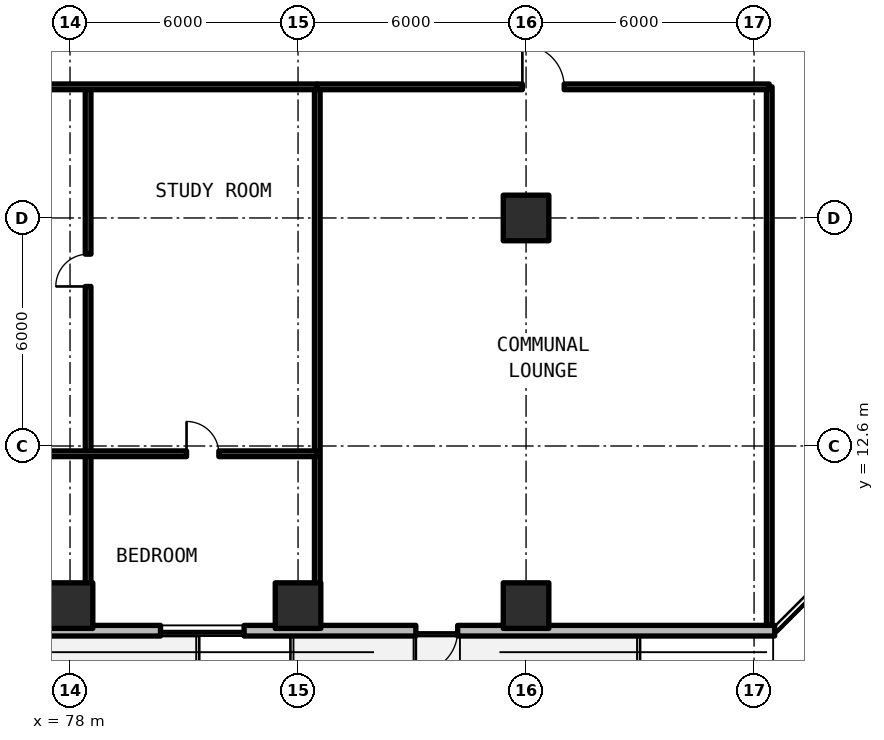
"""IFC4 building model, lengths in metres.
Left out: names, types, materials, properties, quantities, classifications, styles, units other than length and angle.
Written with IfcOpenShell. Run it as: python <this file> out.ifc"""

import sys

from ifc_helpers import new_model, si_unit, direction, frame, frame_2d, origin, origin_2d, place, context, subcontext, project, spatial, rectangle, extrude, element, fill, save


model = new_model("IFC4")
c1 = context("Model", 3, precision=1e-05, world=origin(), true_north=direction((0.0, 1.0)))
c2 = subcontext(c1, "Body", "Model", "MODEL_VIEW")
j1 = project(units=[si_unit("LENGTHUNIT", "METRE"), si_unit("PLANEANGLEUNIT", "RADIAN")], contexts=[c1])
p1 = place(None, origin())
s1 = spatial("IfcSite", under=j1, at=p1, CompositionType="ELEMENT")
p2 = place(p1, origin())
s2 = spatial("IfcBuilding", under=s1, at=p2, CompositionType="ELEMENT")
p3 = place(p2, frame((0.0, 0.0, 52.14)))
s3 = spatial("IfcBuildingStorey", under=s2, at=p3, CompositionType="ELEMENT", Elevation=52.14)
for number, where, z_axis, x_axis in (
    (1, (90.0, 18.6, 0.0), (0.0, 0.0, 1.0), (1.0, 0.0, 0.0)),
    (2, (78.0, 8.4, 0.0), (0.0, 0.0, 1.0), (1.0, 0.0, 0.0)),
    (3, (84.0, 8.4, 0.0), (0.0, 0.0, 1.0), (1.0, 0.0, 0.0)),
    (4, (90.0, 8.4, 0.0), (0.0, 0.0, 1.0), (1.0, 0.0, 0.0)),
):
    element("IfcColumn", number, at=place(p3, frame(where, z_axis=z_axis, x_axis=x_axis)), inside=s3, PredefinedType="COLUMN", context=c2, shape_type="SweptSolid", body=[
        extrude(rectangle(XDim=1.2, YDim=1.2, at=origin_2d()), origin(), (0.0, 0.0, 1.0), 3.3),
    ])
p4 = place(p3, frame((52.14, 7.74, 0.0), z_axis=(0.0, 0.0, 1.0), x_axis=(1.0, 0.0, 0.0)))
e5 = element("IfcWall", 5, at=p4, inside=s3, PredefinedType="SOLIDWALL", context=c2, shape_type="SweptSolid", body=[
    extrude(rectangle(XDim=44.402, YDim=0.28, at=frame_2d((22.201, 0.0))), origin(), (0.0, 0.0, 1.0), 3.08),
])
p5 = place(p4, frame((11.01, 0.0, 0.0)))
e6 = element("IfcOpeningElement", 6, at=p5, cuts=e5, PredefinedType="OPENING", context=c2, shape_type="SweptSolid", body=[
    extrude(rectangle(XDim=1.1, YDim=2.15, at=frame_2d((0.55, 1.075))), frame((0.0, 0.15, 0.0), z_axis=(0.0, -1.0, 0.0), x_axis=(1.0, 0.0, 0.0)), (0.0, 0.0, 1.0), 0.3),
])
p6 = place(p4, frame((22.86, 0.0, 0.0)))
e7 = element("IfcOpeningElement", 7, at=p6, cuts=e5, PredefinedType="OPENING", context=c2, shape_type="SweptSolid", body=[
    extrude(rectangle(XDim=1.1, YDim=2.15, at=frame_2d((0.55, 1.075))), frame((0.0, 0.15, 0.0), z_axis=(0.0, -1.0, 0.0), x_axis=(1.0, 0.0, 0.0)), (0.0, 0.0, 1.0), 0.3),
])
p7 = place(p4, frame((34.96, 0.0, 0.0)))
e8 = element("IfcOpeningElement", 8, at=p7, cuts=e5, PredefinedType="OPENING", context=c2, shape_type="SweptSolid", body=[
    extrude(rectangle(XDim=1.1, YDim=2.15, at=frame_2d((0.55, 1.075))), frame((0.0, 0.15, 0.0), z_axis=(0.0, -1.0, 0.0), x_axis=(1.0, 0.0, 0.0)), (0.0, 0.0, 1.0), 0.3),
])
p8 = place(p4, frame((2.69, 0.0, 0.78)))
e9 = element("IfcOpeningElement", 9, at=p8, cuts=e5, PredefinedType="OPENING", context=c2, shape_type="SweptSolid", body=[
    extrude(rectangle(XDim=2.2, YDim=1.66, at=frame_2d((1.1, 0.83))), frame((0.0, 0.15, 0.0), z_axis=(0.0, -1.0, 0.0), x_axis=(1.0, 0.0, 0.0)), (0.0, 0.0, 1.0), 0.3),
])
p9 = place(p4, frame((15.61, 0.0, 0.78)))
e10 = element("IfcOpeningElement", 10, at=p9, cuts=e5, PredefinedType="OPENING", context=c2, shape_type="SweptSolid", body=[
    extrude(rectangle(XDim=2.2, YDim=1.66, at=frame_2d((1.1, 0.83))), frame((0.0, 0.15, 0.0), z_axis=(0.0, -1.0, 0.0), x_axis=(1.0, 0.0, 0.0)), (0.0, 0.0, 1.0), 0.3),
])
p10 = place(p4, frame((28.241, 0.0, 0.78)))
e11 = element("IfcOpeningElement", 11, at=p10, cuts=e5, PredefinedType="OPENING", context=c2, shape_type="SweptSolid", body=[
    extrude(rectangle(XDim=2.2, YDim=1.66, at=frame_2d((1.1, 0.83))), frame((0.0, 0.15, 0.0), z_axis=(0.0, -1.0, 0.0), x_axis=(1.0, 0.0, 0.0)), (0.0, 0.0, 1.0), 0.3),
])
for number, where, z_axis, x_axis in (
    (12, (96.4, 7.88, 0.0), (0.0, 0.0, 1.0), (0.0, 1.0, 0.0)),
    (13, (84.506, 7.88, 0.0), (0.0, 0.0, 1.0), (0.0, 1.0, 0.0)),
):
    element("IfcWall", number, at=place(p3, frame(where, z_axis=z_axis, x_axis=x_axis)), inside=s3, PredefinedType="SOLIDWALL", context=c2, shape_type="SweptSolid", body=[
        extrude(rectangle(XDim=14.17, YDim=0.15, at=frame_2d((7.085, 0.0))), origin(), (0.0, 0.0, 1.0), 2.35),
    ])
p11 = place(p3, frame((78.476, 12.396, 0.0), z_axis=(0.0, 0.0, 1.0), x_axis=(0.0, 1.0, 0.0)))
e14 = element("IfcWall", 14, at=p11, inside=s3, PredefinedType="PARTITIONING", context=c2, shape_type="SweptSolid", body=[
    extrude(rectangle(XDim=9.655, YDim=0.15, at=frame_2d((4.827, 0.0))), origin(), (0.0, 0.0, 1.0), 2.35),
])
p12 = place(p11, frame((4.402, 0.0, 0.0)))
e15 = element("IfcOpeningElement", 15, at=p12, cuts=e14, PredefinedType="OPENING", context=c2, shape_type="SweptSolid", body=[
    extrude(rectangle(XDim=0.85, YDim=2.1, at=frame_2d((0.425, 1.05))), frame((0.0, 0.085, 0.0), z_axis=(0.0, -1.0, 0.0), x_axis=(1.0, 0.0, 0.0)), (0.0, 0.0, 1.0), 0.17),
])
p13 = place(p3, frame((78.476, 7.88, 0.0), z_axis=(0.0, 0.0, 1.0), x_axis=(0.0, 1.0, 0.0)))
e16 = element("IfcWall", 16, at=p13, inside=s3, PredefinedType="PARTITIONING", context=c2, shape_type="SweptSolid", body=[
    extrude(rectangle(XDim=4.516, YDim=0.15, at=frame_2d((2.258, 0.0))), origin(), (0.0, 0.0, 1.0), 2.35),
])
p14 = place(p3, frame((71.943, 12.396, 0.0), z_axis=(0.0, 0.0, 1.0), x_axis=(1.0, 0.0, 0.0)))
e17 = element("IfcWall", 17, at=p14, inside=s3, PredefinedType="PARTITIONING", context=c2, shape_type="SweptSolid", body=[
    extrude(rectangle(XDim=12.564, YDim=0.15, at=frame_2d((6.282, 0.0))), origin(), (0.0, 0.0, 1.0), 2.35),
])
p15 = place(p14, frame((4.017, 0.0, 0.0)))
e18 = element("IfcOpeningElement", 18, at=p15, cuts=e17, PredefinedType="OPENING", context=c2, shape_type="SweptSolid", body=[
    extrude(rectangle(XDim=0.85, YDim=2.1, at=frame_2d((0.425, 1.05))), frame((0.0, 0.085, 0.0), z_axis=(0.0, -1.0, 0.0), x_axis=(1.0, 0.0, 0.0)), (0.0, 0.0, 1.0), 0.17),
])
p16 = place(p14, frame((9.123, 0.0, 0.0)))
e19 = element("IfcOpeningElement", 19, at=p16, cuts=e17, PredefinedType="OPENING", context=c2, shape_type="SweptSolid", body=[
    extrude(rectangle(XDim=0.85, YDim=2.1, at=frame_2d((0.425, 1.05))), frame((0.0, 0.085, 0.0), z_axis=(0.0, -1.0, 0.0), x_axis=(1.0, 0.0, 0.0)), (0.0, 0.0, 1.0), 0.17),
])
p17 = place(p3, frame((71.943, 22.05, 0.0), z_axis=(0.0, 0.0, 1.0), x_axis=(1.0, 0.0, 0.0)))
e20 = element("IfcWall", 20, at=p17, inside=s3, PredefinedType="SOLIDWALL", context=c2, shape_type="SweptSolid", body=[
    extrude(rectangle(XDim=12.564, YDim=0.15, at=frame_2d((6.282, 0.0))), origin(), (0.0, 0.0, 1.0), 2.35),
])
p18 = place(p17, frame((4.493, 0.0, 0.0)))
e21 = element("IfcOpeningElement", 21, at=p18, cuts=e20, PredefinedType="OPENING", context=c2, shape_type="SweptSolid", body=[
    extrude(rectangle(XDim=0.95, YDim=2.15, at=frame_2d((0.475, 1.075))), frame((0.0, 0.085, 0.0), z_axis=(0.0, -1.0, 0.0), x_axis=(1.0, 0.0, 0.0)), (0.0, 0.0, 1.0), 0.17),
])
p19 = place(p3, frame((84.506, 22.05, 0.0), z_axis=(0.0, 0.0, 1.0), x_axis=(1.0, 0.0, 0.0)))
e22 = element("IfcWall", 22, at=p19, inside=s3, PredefinedType="SOLIDWALL", context=c2, shape_type="SweptSolid", body=[
    extrude(rectangle(XDim=11.894, YDim=0.15, at=frame_2d((5.947, 0.0))), origin(), (0.0, 0.0, 1.0), 2.35),
])
p20 = place(p19, frame((5.397, 0.0, 0.0)))
e23 = element("IfcOpeningElement", 23, at=p20, cuts=e22, PredefinedType="OPENING", context=c2, shape_type="SweptSolid", body=[
    extrude(rectangle(XDim=1.1, YDim=2.15, at=frame_2d((0.55, 1.075))), frame((0.0, 0.085, 0.0), z_axis=(0.0, -1.0, 0.0), x_axis=(1.0, 0.0, 0.0)), (0.0, 0.0, 1.0), 0.17),
])
p21 = place(p7, frame((1.1, 0.0, 0.0), z_axis=(0.0, 0.0, 1.0), x_axis=(-1.0, 0.0, 0.0)))
e24 = element("IfcDoor", 24, at=p21, inside=s3, OperationType="SINGLE_SWING_LEFT", PredefinedType="DOOR", context=c2, shape_type="SweptSolid", body=[
    extrude(rectangle(XDim=1.1, YDim=2.15, at=frame_2d((0.55, 1.075))), frame((0.0, 0.025, 0.0), z_axis=(0.0, -1.0, 0.0), x_axis=(1.0, 0.0, 0.0)), (0.0, 0.0, 1.0), 0.05),
])
fill(e8, e24)
p22 = place(p10, origin())
e25 = element("IfcWindow", 25, at=p22, inside=s3, PartitioningType="SINGLE_PANEL", PredefinedType="WINDOW", context=c2, shape_type="SweptSolid", body=[
    extrude(rectangle(XDim=2.2, YDim=1.66, at=frame_2d((1.1, 0.83))), frame((0.0, 0.03, 0.0), z_axis=(0.0, -1.0, 0.0), x_axis=(1.0, 0.0, 0.0)), (0.0, 0.0, 1.0), 0.06),
])
fill(e11, e25)
p23 = place(p12, origin())
e26 = element("IfcDoor", 26, at=p23, inside=s3, OperationType="SINGLE_SWING_LEFT", PredefinedType="DOOR", context=c2, shape_type="SweptSolid", body=[
    extrude(rectangle(XDim=0.85, YDim=2.1, at=frame_2d((0.425, 1.05))), frame((0.0, 0.025, 0.0), z_axis=(0.0, -1.0, 0.0), x_axis=(1.0, 0.0, 0.0)), (0.0, 0.0, 1.0), 0.05),
])
fill(e15, e26)
p24 = place(p16, origin())
e27 = element("IfcDoor", 27, at=p24, inside=s3, OperationType="SINGLE_SWING_LEFT", PredefinedType="DOOR", context=c2, shape_type="SweptSolid", body=[
    extrude(rectangle(XDim=0.85, YDim=2.1, at=frame_2d((0.425, 1.05))), frame((0.0, 0.025, 0.0), z_axis=(0.0, -1.0, 0.0), x_axis=(1.0, 0.0, 0.0)), (0.0, 0.0, 1.0), 0.05),
])
fill(e19, e27)
p25 = place(p20, origin())
e28 = element("IfcDoor", 28, at=p25, inside=s3, OperationType="SINGLE_SWING_LEFT", PredefinedType="DOOR", context=c2, shape_type="SweptSolid", body=[
    extrude(rectangle(XDim=1.1, YDim=2.15, at=frame_2d((0.55, 1.075))), frame((0.0, 0.025, 0.0), z_axis=(0.0, -1.0, 0.0), x_axis=(1.0, 0.0, 0.0)), (0.0, 0.0, 1.0), 0.05),
])
fill(e23, e28)
save(model, sys.argv[1])
